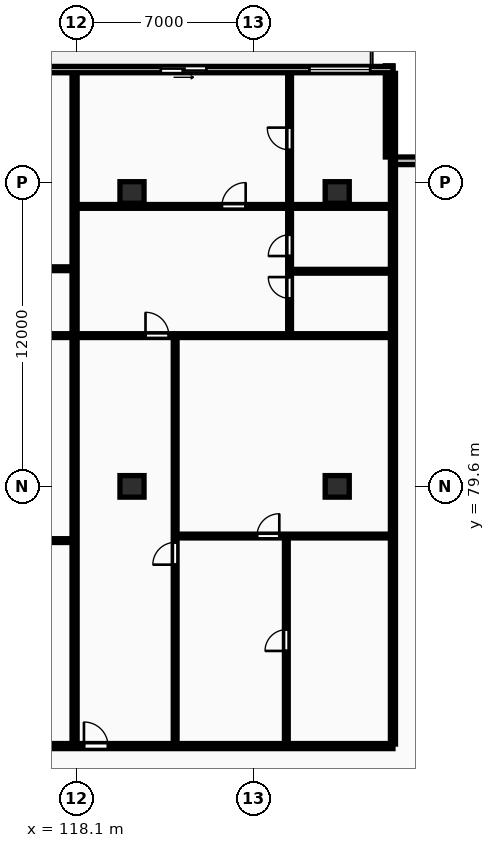
"""IFC4 building model, lengths in metres.
Left out: names, types, materials, properties, quantities, classifications, styles, units other than length and angle.
Written with IfcOpenShell. Run it as: python <this file> out.ifc"""

import sys

from ifc_helpers import new_model, si_unit, direction, frame, frame_2d, origin, origin_2d, place, context, subcontext, project, spatial, rectangle, extrude, element, fill, save


model = new_model("IFC4")
c1 = context("Model", 3, precision=1e-05, world=origin(), true_north=direction((0.0, 1.0)))
c2 = subcontext(c1, "Body", "Model", "MODEL_VIEW")
j1 = project(units=[si_unit("LENGTHUNIT", "METRE"), si_unit("PLANEANGLEUNIT", "RADIAN")], contexts=[c1])
p1 = place(None, origin())
s1 = spatial("IfcSite", under=j1, at=p1, CompositionType="ELEMENT")
p2 = place(p1, origin())
s2 = spatial("IfcBuilding", under=s1, at=p2, CompositionType="ELEMENT")
p3 = place(p2, frame((0.0, 0.0, 80.8)))
s3 = spatial("IfcBuildingStorey", under=s2, at=p3, CompositionType="ELEMENT", Elevation=80.8)
for number, where, z_axis, x_axis in (
    (1, (120.3, 79.6, 0.0), (0.0, 0.0, 1.0), (1.0, 0.0, 0.0)),
    (2, (120.3, 91.2, 0.0), (0.0, 0.0, 1.0), (1.0, 0.0, 0.0)),
    (3, (128.4, 79.6, 0.0), (0.0, 0.0, 1.0), (1.0, 0.0, 0.0)),
    (4, (128.4, 91.2, 0.0), (0.0, 0.0, 1.0), (1.0, 0.0, 0.0)),
):
    element("IfcColumn", number, at=place(p3, frame(where, z_axis=z_axis, x_axis=x_axis)), inside=s3, PredefinedType="COLUMN", context=c2, shape_type="SweptSolid", body=[
        extrude(rectangle(XDim=0.95, YDim=0.85, at=origin_2d()), origin(), (0.0, 0.0, 1.0), 3.25),
    ])
for number, where, z_axis, x_axis in (
    (5, (134.2, 92.45, 0.0), (0.0, 0.0, 1.0), (-1.0, 0.0, 0.0)),
    (6, (130.45, 92.6, 0.0), (0.0, 0.0, 1.0), (0.0, 1.0, 0.0)),
):
    element("IfcWall", number, at=place(p3, frame(where, z_axis=z_axis, x_axis=x_axis)), inside=s3, PredefinedType="STANDARD", context=c2, shape_type="SweptSolid", body=[
        extrude(rectangle(XDim=3.6, YDim=0.3, at=frame_2d((1.8, 0.0))), origin(), (0.0, 0.0, 1.0), 2.97),
    ])
p4 = place(p3, frame((130.6, 96.05, 0.0), z_axis=(0.0, 0.0, 1.0), x_axis=(-1.0, 0.0, 0.0)))
e7 = element("IfcWall", 7, at=p4, inside=s3, PredefinedType="STANDARD", context=c2, shape_type="SweptSolid", body=[
    extrude(rectangle(XDim=73.0, YDim=0.25, at=frame_2d((36.5, 0.0))), origin(), (0.0, 0.0, 1.0), 2.97),
])
p5 = place(p4, frame((67.867, 0.0, 0.0)))
e8 = element("IfcOpeningElement", 8, at=p5, cuts=e7, PredefinedType="OPENING", context=c2, shape_type="SweptSolid", body=[
    extrude(rectangle(XDim=1.8, YDim=2.2, at=frame_2d((0.9, 1.1))), frame((0.0, 0.135, 0.0), z_axis=(0.0, -1.0, 0.0), x_axis=(1.0, 0.0, 0.0)), (0.0, 0.0, 1.0), 0.27),
])
p6 = place(p4, frame((62.103, 0.0, 0.85)))
e9 = element("IfcOpeningElement", 9, at=p6, cuts=e7, PredefinedType="OPENING", context=c2, shape_type="SweptSolid", body=[
    extrude(rectangle(XDim=1.8, YDim=1.8, at=frame_2d((0.9, 0.9))), frame((0.0, 0.135, 0.0), z_axis=(0.0, -1.0, 0.0), x_axis=(1.0, 0.0, 0.0)), (0.0, 0.0, 1.0), 0.27),
])
p7 = place(p4, frame((56.196, 0.0, 0.0)))
e10 = element("IfcOpeningElement", 10, at=p7, cuts=e7, PredefinedType="OPENING", context=c2, shape_type="SweptSolid", body=[
    extrude(rectangle(XDim=1.8, YDim=2.2, at=frame_2d((0.9, 1.1))), frame((0.0, 0.135, 0.0), z_axis=(0.0, -1.0, 0.0), x_axis=(1.0, 0.0, 0.0)), (0.0, 0.0, 1.0), 0.27),
])
p8 = place(p4, frame((46.557, 0.0, 0.85)))
e11 = element("IfcOpeningElement", 11, at=p8, cuts=e7, PredefinedType="OPENING", context=c2, shape_type="SweptSolid", body=[
    extrude(rectangle(XDim=2.4, YDim=1.9, at=frame_2d((1.2, 0.95))), frame((0.0, 0.135, 0.0), z_axis=(0.0, -1.0, 0.0), x_axis=(1.0, 0.0, 0.0)), (0.0, 0.0, 1.0), 0.27),
])
p9 = place(p4, frame((36.714, 0.0, 0.0)))
e12 = element("IfcOpeningElement", 12, at=p9, cuts=e7, PredefinedType="OPENING", context=c2, shape_type="SweptSolid", body=[
    extrude(rectangle(XDim=1.8, YDim=2.2, at=frame_2d((0.9, 1.1))), frame((0.0, 0.135, 0.0), z_axis=(0.0, -1.0, 0.0), x_axis=(1.0, 0.0, 0.0)), (0.0, 0.0, 1.0), 0.27),
])
p10 = place(p4, frame((30.483, 0.0, 0.85)))
e13 = element("IfcOpeningElement", 13, at=p10, cuts=e7, PredefinedType="OPENING", context=c2, shape_type="SweptSolid", body=[
    extrude(rectangle(XDim=1.8, YDim=1.8, at=frame_2d((0.9, 0.9))), frame((0.0, 0.135, 0.0), z_axis=(0.0, -1.0, 0.0), x_axis=(1.0, 0.0, 0.0)), (0.0, 0.0, 1.0), 0.27),
])
p11 = place(p4, frame((21.604, 0.0, 0.85)))
e14 = element("IfcOpeningElement", 14, at=p11, cuts=e7, PredefinedType="OPENING", context=c2, shape_type="SweptSolid", body=[
    extrude(rectangle(XDim=2.4, YDim=1.9, at=frame_2d((1.2, 0.95))), frame((0.0, 0.135, 0.0), z_axis=(0.0, -1.0, 0.0), x_axis=(1.0, 0.0, 0.0)), (0.0, 0.0, 1.0), 0.27),
])
p12 = place(p4, frame((17.698, 0.0, 0.85)))
e15 = element("IfcOpeningElement", 15, at=p12, cuts=e7, PredefinedType="OPENING", context=c2, shape_type="SweptSolid", body=[
    extrude(rectangle(XDim=1.8, YDim=1.8, at=frame_2d((0.9, 0.9))), frame((0.0, 0.135, 0.0), z_axis=(0.0, -1.0, 0.0), x_axis=(1.0, 0.0, 0.0)), (0.0, 0.0, 1.0), 0.27),
])
p13 = place(p4, frame((26.363, 0.0, 0.0)))
e16 = element("IfcOpeningElement", 16, at=p13, cuts=e7, PredefinedType="OPENING", context=c2, shape_type="SweptSolid", body=[
    extrude(rectangle(XDim=1.8, YDim=2.2, at=frame_2d((0.9, 1.1))), frame((0.0, 0.135, 0.0), z_axis=(0.0, -1.0, 0.0), x_axis=(1.0, 0.0, 0.0)), (0.0, 0.0, 1.0), 0.27),
])
p14 = place(p4, frame((13.753, 0.0, 0.85)))
e17 = element("IfcOpeningElement", 17, at=p14, cuts=e7, PredefinedType="OPENING", context=c2, shape_type="SweptSolid", body=[
    extrude(rectangle(XDim=1.8, YDim=1.8, at=frame_2d((0.9, 0.9))), frame((0.0, 0.135, 0.0), z_axis=(0.0, -1.0, 0.0), x_axis=(1.0, 0.0, 0.0)), (0.0, 0.0, 1.0), 0.27),
])
p15 = place(p4, frame((7.363, 0.0, 0.0)))
e18 = element("IfcOpeningElement", 18, at=p15, cuts=e7, PredefinedType="OPENING", context=c2, shape_type="SweptSolid", body=[
    extrude(rectangle(XDim=1.8, YDim=2.2, at=frame_2d((0.9, 1.1))), frame((0.0, 0.135, 0.0), z_axis=(0.0, -1.0, 0.0), x_axis=(1.0, 0.0, 0.0)), (0.0, 0.0, 1.0), 0.27),
])
p16 = place(p4, frame((0.9, 0.0, 0.85)))
e19 = element("IfcOpeningElement", 19, at=p16, cuts=e7, PredefinedType="OPENING", context=c2, shape_type="SweptSolid", body=[
    extrude(rectangle(XDim=2.4, YDim=1.9, at=frame_2d((1.2, 0.95))), frame((0.0, 0.135, 0.0), z_axis=(0.0, -1.0, 0.0), x_axis=(1.0, 0.0, 0.0)), (0.0, 0.0, 1.0), 0.27),
])
for number, where, z_axis, x_axis in (
    (20, (130.6, 69.43, 0.0), (0.0, 0.0, 1.0), (0.0, 1.0, 0.0)),
    (21, (118.033, 69.43, 0.0), (0.0, 0.0, 1.0), (0.0, 1.0, 0.0)),
):
    element("IfcWall", number, at=place(p3, frame(where, z_axis=z_axis, x_axis=x_axis)), inside=s3, PredefinedType="PARTITIONING", context=c2, shape_type="SweptSolid", body=[
        extrude(rectangle(XDim=26.47, YDim=0.2, at=frame_2d((13.235, 0.0))), origin(), (0.0, 0.0, 1.0), 2.97),
    ])
p17 = place(p3, frame((105.017, 77.46, 0.0), z_axis=(0.0, 0.0, 1.0), x_axis=(1.0, 0.0, 0.0)))
e22 = element("IfcWall", 22, at=p17, inside=s3, PredefinedType="PARTITIONING", context=c2, shape_type="SweptSolid", body=[
    extrude(rectangle(XDim=12.936, YDim=0.15, at=frame_2d((6.468, 0.0))), origin(), (0.0, 0.0, 1.0), 2.97),
])
p18 = place(p17, frame((4.464, 0.0, 0.0)))
e23 = element("IfcOpeningElement", 23, at=p18, cuts=e22, PredefinedType="OPENING", context=c2, shape_type="SweptSolid", body=[
    extrude(rectangle(XDim=0.88, YDim=2.06, at=frame_2d((0.44, 1.03))), frame((0.0, 0.085, 0.0), z_axis=(0.0, -1.0, 0.0), x_axis=(1.0, 0.0, 0.0)), (0.0, 0.0, 1.0), 0.17),
])
p19 = place(p3, frame((105.607, 88.19, 0.0), z_axis=(0.0, 0.0, 1.0), x_axis=(1.0, 0.0, 0.0)))
e24 = element("IfcWall", 24, at=p19, inside=s3, PredefinedType="PARTITIONING", context=c2, shape_type="SweptSolid", body=[
    extrude(rectangle(XDim=12.346, YDim=0.15, at=frame_2d((6.173, 0.0))), origin(), (0.0, 0.0, 1.0), 2.97),
])
p20 = place(p19, frame((1.034, 0.0, 0.0)))
e25 = element("IfcOpeningElement", 25, at=p20, cuts=e24, PredefinedType="OPENING", context=c2, shape_type="SweptSolid", body=[
    extrude(rectangle(XDim=0.84, YDim=2.04, at=frame_2d((0.42, 1.02))), frame((0.0, 0.085, 0.0), z_axis=(0.0, -1.0, 0.0), x_axis=(1.0, 0.0, 0.0)), (0.0, 0.0, 1.0), 0.17),
])
p21 = place(p19, frame((5.753, 0.0, 0.0)))
e26 = element("IfcOpeningElement", 26, at=p21, cuts=e24, PredefinedType="OPENING", context=c2, shape_type="SweptSolid", body=[
    extrude(rectangle(XDim=0.84, YDim=2.04, at=frame_2d((0.42, 1.02))), frame((0.0, 0.085, 0.0), z_axis=(0.0, -1.0, 0.0), x_axis=(1.0, 0.0, 0.0)), (0.0, 0.0, 1.0), 0.17),
])
p22 = place(p19, frame((8.623, 0.0, 0.0)))
e27 = element("IfcOpeningElement", 27, at=p22, cuts=e24, PredefinedType="OPENING", context=c2, shape_type="SweptSolid", body=[
    extrude(rectangle(XDim=0.84, YDim=2.04, at=frame_2d((0.42, 1.02))), frame((0.0, 0.085, 0.0), z_axis=(0.0, -1.0, 0.0), x_axis=(1.0, 0.0, 0.0)), (0.0, 0.0, 1.0), 0.17),
])
p23 = place(p3, frame((101.067, 85.55, 0.0), z_axis=(0.0, 0.0, 1.0), x_axis=(1.0, 0.0, 0.0)))
e28 = element("IfcWall", 28, at=p23, inside=s3, PredefinedType="PARTITIONING", context=c2, shape_type="SweptSolid", body=[
    extrude(rectangle(XDim=16.886, YDim=0.15, at=frame_2d((8.443, 0.0))), origin(), (0.0, 0.0, 1.0), 2.97),
])
p24 = place(p23, frame((2.72, 0.0, 0.0)))
e29 = element("IfcOpeningElement", 29, at=p24, cuts=e28, PredefinedType="OPENING", context=c2, shape_type="SweptSolid", body=[
    extrude(rectangle(XDim=0.92, YDim=2.08, at=frame_2d((0.46, 1.04))), frame((0.0, 0.085, 0.0), z_axis=(0.0, -1.0, 0.0), x_axis=(1.0, 0.0, 0.0)), (0.0, 0.0, 1.0), 0.17),
])
p25 = place(p3, frame((126.392, 69.41, 0.0), z_axis=(0.0, 0.0, 1.0), x_axis=(0.0, 1.0, 0.0)))
e30 = element("IfcWall", 30, at=p25, inside=s3, PredefinedType="PARTITIONING", context=c2, shape_type="SweptSolid", body=[
    extrude(rectangle(XDim=8.23, YDim=0.15, at=frame_2d((4.115, 0.0))), origin(), (0.0, 0.0, 1.0), 2.97),
])
p26 = place(p25, frame((3.695, 0.0, 0.0)))
e31 = element("IfcOpeningElement", 31, at=p26, cuts=e30, PredefinedType="OPENING", context=c2, shape_type="SweptSolid", body=[
    extrude(rectangle(XDim=0.84, YDim=2.04, at=frame_2d((0.42, 1.02))), frame((0.0, 0.085, 0.0), z_axis=(0.0, -1.0, 0.0), x_axis=(1.0, 0.0, 0.0)), (0.0, 0.0, 1.0), 0.17),
])
p27 = place(p3, frame((122.063, 77.64, 0.0), z_axis=(0.0, 0.0, 1.0), x_axis=(1.0, 0.0, 0.0)))
e32 = element("IfcWall", 32, at=p27, inside=s3, PredefinedType="PARTITIONING", context=c2, shape_type="SweptSolid", body=[
    extrude(rectangle(XDim=8.457, YDim=0.15, at=frame_2d((4.228, 0.0))), origin(), (0.0, 0.0, 1.0), 2.97),
])
p28 = place(p27, frame((3.171, 0.0, 0.0)))
e33 = element("IfcOpeningElement", 33, at=p28, cuts=e32, PredefinedType="OPENING", context=c2, shape_type="SweptSolid", body=[
    extrude(rectangle(XDim=0.88, YDim=2.06, at=frame_2d((0.44, 1.03))), frame((0.0, 0.085, 0.0), z_axis=(0.0, -1.0, 0.0), x_axis=(1.0, 0.0, 0.0)), (0.0, 0.0, 1.0), 0.17),
])
p29 = place(p3, frame((122.003, 69.41, 0.0), z_axis=(0.0, 0.0, 1.0), x_axis=(0.0, 1.0, 0.0)))
e34 = element("IfcWall", 34, at=p29, inside=s3, PredefinedType="PARTITIONING", context=c2, shape_type="SweptSolid", body=[
    extrude(rectangle(XDim=16.1, YDim=0.15, at=frame_2d((8.05, 0.0))), origin(), (0.0, 0.0, 1.0), 2.97),
])
p30 = place(p29, frame((7.1, 0.0, 0.0)))
e35 = element("IfcOpeningElement", 35, at=p30, cuts=e34, PredefinedType="OPENING", context=c2, shape_type="SweptSolid", body=[
    extrude(rectangle(XDim=0.88, YDim=2.06, at=frame_2d((0.44, 1.03))), frame((0.0, 0.085, 0.0), z_axis=(0.0, -1.0, 0.0), x_axis=(1.0, 0.0, 0.0)), (0.0, 0.0, 1.0), 0.17),
])
p31 = place(p3, frame((126.58, 88.09, 0.0), z_axis=(0.0, 0.0, 1.0), x_axis=(1.0, 0.0, 0.0)))
e36 = element("IfcWall", 36, at=p31, inside=s3, PredefinedType="PARTITIONING", context=c2, shape_type="SweptSolid", body=[
    extrude(rectangle(XDim=3.94, YDim=0.15, at=frame_2d((1.97, 0.0))), origin(), (0.0, 0.0, 1.0), 2.97),
])
p32 = place(p3, frame((126.52, 85.59, 0.0), z_axis=(0.0, 0.0, 1.0), x_axis=(0.0, 1.0, 0.0)))
e37 = element("IfcWall", 37, at=p32, inside=s3, PredefinedType="PARTITIONING", context=c2, shape_type="SweptSolid", body=[
    extrude(rectangle(XDim=10.31, YDim=0.15, at=frame_2d((5.155, 0.0))), origin(), (0.0, 0.0, 1.0), 2.97),
])
p33 = place(p32, frame((1.43, 0.0, 0.0)))
e38 = element("IfcOpeningElement", 38, at=p33, cuts=e37, PredefinedType="OPENING", context=c2, shape_type="SweptSolid", body=[
    extrude(rectangle(XDim=0.84, YDim=2.04, at=frame_2d((0.42, 1.02))), frame((0.0, 0.085, 0.0), z_axis=(0.0, -1.0, 0.0), x_axis=(1.0, 0.0, 0.0)), (0.0, 0.0, 1.0), 0.17),
])
p34 = place(p32, frame((3.102, 0.0, 0.0)))
e39 = element("IfcOpeningElement", 39, at=p34, cuts=e37, PredefinedType="OPENING", context=c2, shape_type="SweptSolid", body=[
    extrude(rectangle(XDim=0.84, YDim=2.04, at=frame_2d((0.42, 1.02))), frame((0.0, 0.085, 0.0), z_axis=(0.0, -1.0, 0.0), x_axis=(1.0, 0.0, 0.0)), (0.0, 0.0, 1.0), 0.17),
])
p35 = place(p32, frame((7.29, 0.0, 0.0)))
e40 = element("IfcOpeningElement", 40, at=p35, cuts=e37, PredefinedType="OPENING", context=c2, shape_type="SweptSolid", body=[
    extrude(rectangle(XDim=0.88, YDim=2.06, at=frame_2d((0.44, 1.03))), frame((0.0, 0.085, 0.0), z_axis=(0.0, -1.0, 0.0), x_axis=(1.0, 0.0, 0.0)), (0.0, 0.0, 1.0), 0.17),
])
p36 = place(p3, frame((118.113, 85.55, 0.0), z_axis=(0.0, 0.0, 1.0), x_axis=(1.0, 0.0, 0.0)))
e41 = element("IfcWall", 41, at=p36, inside=s3, PredefinedType="PARTITIONING", context=c2, shape_type="SweptSolid", body=[
    extrude(rectangle(XDim=12.407, YDim=0.15, at=frame_2d((6.203, 0.0))), origin(), (0.0, 0.0, 1.0), 2.97),
])
p37 = place(p36, frame((2.72, 0.0, 0.0)))
e42 = element("IfcOpeningElement", 42, at=p37, cuts=e41, PredefinedType="OPENING", context=c2, shape_type="SweptSolid", body=[
    extrude(rectangle(XDim=0.92, YDim=2.08, at=frame_2d((0.46, 1.04))), frame((0.0, 0.085, 0.0), z_axis=(0.0, -1.0, 0.0), x_axis=(1.0, 0.0, 0.0)), (0.0, 0.0, 1.0), 0.17),
])
p38 = place(p3, frame((118.113, 90.65, 0.0), z_axis=(0.0, 0.0, 1.0), x_axis=(1.0, 0.0, 0.0)))
e43 = element("IfcWall", 43, at=p38, inside=s3, PredefinedType="PARTITIONING", context=c2, shape_type="SweptSolid", body=[
    extrude(rectangle(XDim=12.407, YDim=0.15, at=frame_2d((6.203, 0.0))), origin(), (0.0, 0.0, 1.0), 2.97),
])
p39 = place(p38, frame((5.733, 0.0, 0.0)))
e44 = element("IfcOpeningElement", 44, at=p39, cuts=e43, PredefinedType="OPENING", context=c2, shape_type="SweptSolid", body=[
    extrude(rectangle(XDim=0.94, YDim=2.1, at=frame_2d((0.47, 1.05))), frame((0.0, 0.085, 0.0), z_axis=(0.0, -1.0, 0.0), x_axis=(1.0, 0.0, 0.0)), (0.0, 0.0, 1.0), 0.17),
])
p40 = place(p3, frame((57.6, 69.35, 0.0), z_axis=(0.0, 0.0, 1.0), x_axis=(1.0, 0.0, 0.0)))
e45 = element("IfcWall", 45, at=p40, inside=s3, PredefinedType="PARTITIONING", context=c2, shape_type="SweptSolid", body=[
    extrude(rectangle(XDim=73.0, YDim=0.2, at=frame_2d((36.5, 0.0))), origin(), (0.0, 0.0, 1.0), 2.97),
])
p41 = place(p40, frame((0.37, 0.0, 0.0)))
e46 = element("IfcOpeningElement", 46, at=p41, cuts=e45, PredefinedType="OPENING", context=c2, shape_type="SweptSolid", body=[
    extrude(rectangle(XDim=0.95, YDim=2.15, at=frame_2d((0.475, 1.075))), frame((0.0, 0.11, 0.0), z_axis=(0.0, -1.0, 0.0), x_axis=(1.0, 0.0, 0.0)), (0.0, 0.0, 1.0), 0.22),
])
p42 = place(p40, frame((20.421, 0.0, 0.0)))
e47 = element("IfcOpeningElement", 47, at=p42, cuts=e45, PredefinedType="OPENING", context=c2, shape_type="SweptSolid", body=[
    extrude(rectangle(XDim=1.22, YDim=2.18, at=frame_2d((0.61, 1.09))), frame((0.0, 0.11, 0.0), z_axis=(0.0, -1.0, 0.0), x_axis=(1.0, 0.0, 0.0)), (0.0, 0.0, 1.0), 0.22),
])
p43 = place(p40, frame((32.729, 0.0, 0.0)))
e48 = element("IfcOpeningElement", 48, at=p43, cuts=e45, PredefinedType="OPENING", context=c2, shape_type="SweptSolid", body=[
    extrude(rectangle(XDim=0.95, YDim=2.15, at=frame_2d((0.475, 1.075))), frame((0.0, 0.11, 0.0), z_axis=(0.0, -1.0, 0.0), x_axis=(1.0, 0.0, 0.0)), (0.0, 0.0, 1.0), 0.22),
])
p44 = place(p40, frame((46.157, 0.0, 0.0)))
e49 = element("IfcOpeningElement", 49, at=p44, cuts=e45, PredefinedType="OPENING", context=c2, shape_type="SweptSolid", body=[
    extrude(rectangle(XDim=0.95, YDim=2.15, at=frame_2d((0.475, 1.075))), frame((0.0, 0.11, 0.0), z_axis=(0.0, -1.0, 0.0), x_axis=(1.0, 0.0, 0.0)), (0.0, 0.0, 1.0), 0.22),
])
p45 = place(p40, frame((60.803, 0.0, 0.0)))
e50 = element("IfcOpeningElement", 50, at=p45, cuts=e45, PredefinedType="OPENING", context=c2, shape_type="SweptSolid", body=[
    extrude(rectangle(XDim=0.95, YDim=2.15, at=frame_2d((0.475, 1.075))), frame((0.0, 0.11, 0.0), z_axis=(0.0, -1.0, 0.0), x_axis=(1.0, 0.0, 0.0)), (0.0, 0.0, 1.0), 0.22),
])
p46 = place(p15, origin())
e51 = element("IfcDoor", 51, at=p46, inside=s3, OperationType="SLIDING_TO_LEFT", PredefinedType="DOOR", context=c2, shape_type="SweptSolid", body=[
    extrude(rectangle(XDim=1.8, YDim=2.2, at=frame_2d((0.9, 1.1))), frame((0.0, 0.025, 0.0), z_axis=(0.0, -1.0, 0.0), x_axis=(1.0, 0.0, 0.0)), (0.0, 0.0, 1.0), 0.05),
])
fill(e18, e51)
p47 = place(p16, origin())
e52 = element("IfcWindow", 52, at=p47, inside=s3, PartitioningType="DOUBLE_PANEL_VERTICAL", PredefinedType="WINDOW", context=c2, shape_type="SweptSolid", body=[
    extrude(rectangle(XDim=2.4, YDim=1.9, at=frame_2d((1.2, 0.95))), frame((0.0, 0.03, 0.0), z_axis=(0.0, -1.0, 0.0), x_axis=(1.0, 0.0, 0.0)), (0.0, 0.0, 1.0), 0.06),
])
fill(e19, e52)
p48 = place(p26, origin())
e53 = element("IfcDoor", 53, at=p48, inside=s3, OperationType="SINGLE_SWING_LEFT", PredefinedType="DOOR", context=c2, shape_type="SweptSolid", body=[
    extrude(rectangle(XDim=0.84, YDim=2.04, at=frame_2d((0.42, 1.02))), frame((0.0, 0.025, 0.0), z_axis=(0.0, -1.0, 0.0), x_axis=(1.0, 0.0, 0.0)), (0.0, 0.0, 1.0), 0.05),
])
fill(e31, e53)
p49 = place(p28, origin())
e54 = element("IfcDoor", 54, at=p49, inside=s3, OperationType="SINGLE_SWING_RIGHT", PredefinedType="DOOR", context=c2, shape_type="SweptSolid", body=[
    extrude(rectangle(XDim=0.88, YDim=2.06, at=frame_2d((0.44, 1.03))), frame((0.0, 0.025, 0.0), z_axis=(0.0, -1.0, 0.0), x_axis=(1.0, 0.0, 0.0)), (0.0, 0.0, 1.0), 0.05),
])
fill(e33, e54)
p50 = place(p30, origin())
e55 = element("IfcDoor", 55, at=p50, inside=s3, OperationType="SINGLE_SWING_LEFT", PredefinedType="DOOR", context=c2, shape_type="SweptSolid", body=[
    extrude(rectangle(XDim=0.88, YDim=2.06, at=frame_2d((0.44, 1.03))), frame((0.0, 0.025, 0.0), z_axis=(0.0, -1.0, 0.0), x_axis=(1.0, 0.0, 0.0)), (0.0, 0.0, 1.0), 0.05),
])
fill(e35, e55)
p51 = place(p33, origin())
e56 = element("IfcDoor", 56, at=p51, inside=s3, OperationType="SINGLE_SWING_RIGHT", PredefinedType="DOOR", context=c2, shape_type="SweptSolid", body=[
    extrude(rectangle(XDim=0.84, YDim=2.04, at=frame_2d((0.42, 1.02))), frame((0.0, 0.025, 0.0), z_axis=(0.0, -1.0, 0.0), x_axis=(1.0, 0.0, 0.0)), (0.0, 0.0, 1.0), 0.05),
])
fill(e38, e56)
p52 = place(p34, origin())
e57 = element("IfcDoor", 57, at=p52, inside=s3, OperationType="SINGLE_SWING_LEFT", PredefinedType="DOOR", context=c2, shape_type="SweptSolid", body=[
    extrude(rectangle(XDim=0.84, YDim=2.04, at=frame_2d((0.42, 1.02))), frame((0.0, 0.025, 0.0), z_axis=(0.0, -1.0, 0.0), x_axis=(1.0, 0.0, 0.0)), (0.0, 0.0, 1.0), 0.05),
])
fill(e39, e57)
p53 = place(p35, origin())
e58 = element("IfcDoor", 58, at=p53, inside=s3, OperationType="SINGLE_SWING_RIGHT", PredefinedType="DOOR", context=c2, shape_type="SweptSolid", body=[
    extrude(rectangle(XDim=0.88, YDim=2.06, at=frame_2d((0.44, 1.03))), frame((0.0, 0.025, 0.0), z_axis=(0.0, -1.0, 0.0), x_axis=(1.0, 0.0, 0.0)), (0.0, 0.0, 1.0), 0.05),
])
fill(e40, e58)
p54 = place(p37, origin())
e59 = element("IfcDoor", 59, at=p54, inside=s3, OperationType="SINGLE_SWING_LEFT", PredefinedType="DOOR", context=c2, shape_type="SweptSolid", body=[
    extrude(rectangle(XDim=0.92, YDim=2.08, at=frame_2d((0.46, 1.04))), frame((0.0, 0.025, 0.0), z_axis=(0.0, -1.0, 0.0), x_axis=(1.0, 0.0, 0.0)), (0.0, 0.0, 1.0), 0.05),
])
fill(e42, e59)
p55 = place(p39, origin())
e60 = element("IfcDoor", 60, at=p55, inside=s3, OperationType="SINGLE_SWING_RIGHT", PredefinedType="DOOR", context=c2, shape_type="SweptSolid", body=[
    extrude(rectangle(XDim=0.94, YDim=2.1, at=frame_2d((0.47, 1.05))), frame((0.0, 0.025, 0.0), z_axis=(0.0, -1.0, 0.0), x_axis=(1.0, 0.0, 0.0)), (0.0, 0.0, 1.0), 0.05),
])
fill(e44, e60)
p56 = place(p45, origin())
e61 = element("IfcDoor", 61, at=p56, inside=s3, OperationType="SINGLE_SWING_LEFT", PredefinedType="DOOR", context=c2, shape_type="SweptSolid", body=[
    extrude(rectangle(XDim=0.95, YDim=2.15, at=frame_2d((0.475, 1.075))), frame((0.0, 0.025, 0.0), z_axis=(0.0, -1.0, 0.0), x_axis=(1.0, 0.0, 0.0)), (0.0, 0.0, 1.0), 0.05),
])
fill(e50, e61)
save(model, sys.argv[1])
